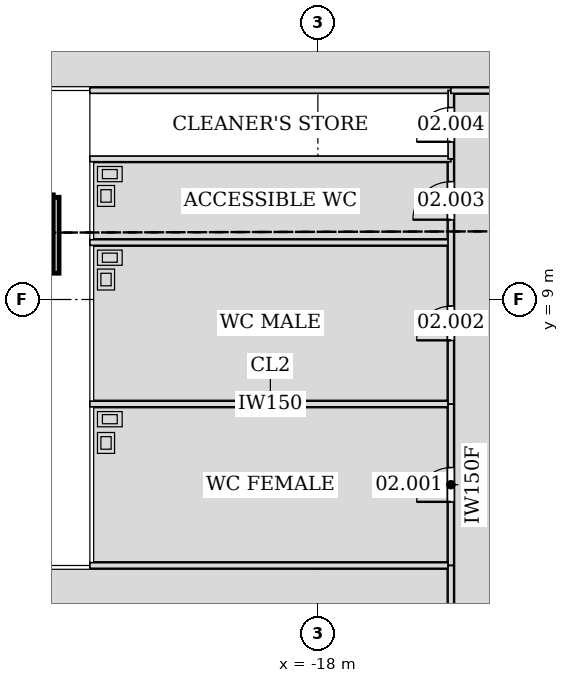
"""IFC4 building model, lengths in metres.
Left out: names, types, materials, properties, quantities, classifications, styles, units other than length and angle.
Written with IfcOpenShell. Run it as: python <this file> out.ifc"""

import sys

from ifc_helpers import new_model, si_unit, direction, frame, frame_2d, origin, origin_2d, place, context, subcontext, project, spatial, rectangle, hollow_rectangle, extrude, element, fill, save


model = new_model("IFC4")
c1 = context("Model", 3, precision=1e-05, world=origin(), true_north=direction((0.0, 1.0)))
c2 = subcontext(c1, "Body", "Model", "MODEL_VIEW")
j1 = project(units=[si_unit("LENGTHUNIT", "METRE"), si_unit("PLANEANGLEUNIT", "RADIAN")], contexts=[c1])
p1 = place(None, origin())
s1 = spatial("IfcSite", under=j1, at=p1, CompositionType="ELEMENT")
p2 = place(p1, origin())
s2 = spatial("IfcBuilding", under=s1, at=p2, CompositionType="ELEMENT")
p3 = place(p2, frame((0.0, 0.0, 13.2)))
s3 = spatial("IfcBuildingStorey", under=s2, at=p3, CompositionType="ELEMENT", Elevation=13.2)
p4 = place(p3, frame((-25.963, 10.754, 0.0), z_axis=(0.028288195063, -0.011703901791, 0.999531288506), x_axis=(0.3823083337, 0.92403481427, 0.0)))
e1 = element("IfcColumn", 1, at=p4, inside=s3, PredefinedType="COLUMN", context=c2, shape_type="SweptSolid", body=[
    extrude(hollow_rectangle(XDim=2.0, YDim=2.0, WallThickness=0.09, at=origin_2d()), origin(), (0.0, 0.0, 1.0), 5.403),
])
p5 = place(p3, frame((-14.788, 35.876, 0.0), z_axis=(0.0, 0.0, 1.0), x_axis=(-0.707106781187, -0.707106781187, 0.0)))
e2 = element("IfcWall", 2, at=p5, inside=s3, PredefinedType="SOLIDWALL", context=c2, shape_type="SweptSolid", body=[
    extrude(rectangle(XDim=29.823, YDim=0.35, at=frame_2d((14.912, 0.0))), origin(), (0.0, 0.0, 1.0), 5.1),
])
p6 = place(p5, frame((0.822, 0.0, 0.9)))
e3 = element("IfcOpeningElement", 3, at=p6, cuts=e2, PredefinedType="OPENING", context=c2, shape_type="SweptSolid", body=[
    extrude(rectangle(XDim=1.2, YDim=3.6, at=frame_2d((0.6, 1.8))), frame((0.0, 0.185, 0.0), z_axis=(0.0, -1.0, 0.0), x_axis=(1.0, 0.0, 0.0)), (0.0, 0.0, 1.0), 0.37),
])
p7 = place(p5, frame((3.52, 0.0, 0.9)))
e4 = element("IfcOpeningElement", 4, at=p7, cuts=e2, PredefinedType="OPENING", context=c2, shape_type="SweptSolid", body=[
    extrude(rectangle(XDim=1.2, YDim=3.6, at=frame_2d((0.6, 1.8))), frame((0.0, 0.185, 0.0), z_axis=(0.0, -1.0, 0.0), x_axis=(1.0, 0.0, 0.0)), (0.0, 0.0, 1.0), 0.37),
])
p8 = place(p5, frame((6.218, 0.0, 0.9)))
e5 = element("IfcOpeningElement", 5, at=p8, cuts=e2, PredefinedType="OPENING", context=c2, shape_type="SweptSolid", body=[
    extrude(rectangle(XDim=1.2, YDim=3.6, at=frame_2d((0.6, 1.8))), frame((0.0, 0.185, 0.0), z_axis=(0.0, -1.0, 0.0), x_axis=(1.0, 0.0, 0.0)), (0.0, 0.0, 1.0), 0.37),
])
p9 = place(p5, frame((8.916, 0.0, 0.9)))
e6 = element("IfcOpeningElement", 6, at=p9, cuts=e2, PredefinedType="OPENING", context=c2, shape_type="SweptSolid", body=[
    extrude(rectangle(XDim=1.2, YDim=3.6, at=frame_2d((0.6, 1.8))), frame((0.0, 0.185, 0.0), z_axis=(0.0, -1.0, 0.0), x_axis=(1.0, 0.0, 0.0)), (0.0, 0.0, 1.0), 0.37),
])
p10 = place(p5, frame((11.614, 0.0, 0.9)))
e7 = element("IfcOpeningElement", 7, at=p10, cuts=e2, PredefinedType="OPENING", context=c2, shape_type="SweptSolid", body=[
    extrude(rectangle(XDim=1.2, YDim=3.6, at=frame_2d((0.6, 1.8))), frame((0.0, 0.185, 0.0), z_axis=(0.0, -1.0, 0.0), x_axis=(1.0, 0.0, 0.0)), (0.0, 0.0, 1.0), 0.37),
])
p11 = place(p5, frame((14.312, 0.0, 0.9)))
e8 = element("IfcOpeningElement", 8, at=p11, cuts=e2, PredefinedType="OPENING", context=c2, shape_type="SweptSolid", body=[
    extrude(rectangle(XDim=1.2, YDim=3.6, at=frame_2d((0.6, 1.8))), frame((0.0, 0.185, 0.0), z_axis=(0.0, -1.0, 0.0), x_axis=(1.0, 0.0, 0.0)), (0.0, 0.0, 1.0), 0.37),
])
p12 = place(p5, frame((17.01, 0.0, 0.9)))
e9 = element("IfcOpeningElement", 9, at=p12, cuts=e2, PredefinedType="OPENING", context=c2, shape_type="SweptSolid", body=[
    extrude(rectangle(XDim=1.2, YDim=3.6, at=frame_2d((0.6, 1.8))), frame((0.0, 0.185, 0.0), z_axis=(0.0, -1.0, 0.0), x_axis=(1.0, 0.0, 0.0)), (0.0, 0.0, 1.0), 0.37),
])
p13 = place(p5, frame((19.708, 0.0, 0.9)))
e10 = element("IfcOpeningElement", 10, at=p13, cuts=e2, PredefinedType="OPENING", context=c2, shape_type="SweptSolid", body=[
    extrude(rectangle(XDim=1.2, YDim=3.6, at=frame_2d((0.6, 1.8))), frame((0.0, 0.185, 0.0), z_axis=(0.0, -1.0, 0.0), x_axis=(1.0, 0.0, 0.0)), (0.0, 0.0, 1.0), 0.37),
])
p14 = place(p5, frame((22.406, 0.0, 0.9)))
e11 = element("IfcOpeningElement", 11, at=p14, cuts=e2, PredefinedType="OPENING", context=c2, shape_type="SweptSolid", body=[
    extrude(rectangle(XDim=1.2, YDim=3.6, at=frame_2d((0.6, 1.8))), frame((0.0, 0.185, 0.0), z_axis=(0.0, -1.0, 0.0), x_axis=(1.0, 0.0, 0.0)), (0.0, 0.0, 1.0), 0.37),
])
p15 = place(p5, frame((25.104, 0.0, 0.9)))
e12 = element("IfcOpeningElement", 12, at=p15, cuts=e2, PredefinedType="OPENING", context=c2, shape_type="SweptSolid", body=[
    extrude(rectangle(XDim=1.2, YDim=3.6, at=frame_2d((0.6, 1.8))), frame((0.0, 0.185, 0.0), z_axis=(0.0, -1.0, 0.0), x_axis=(1.0, 0.0, 0.0)), (0.0, 0.0, 1.0), 0.37),
])
p16 = place(p5, frame((27.802, 0.0, 0.9)))
e13 = element("IfcOpeningElement", 13, at=p16, cuts=e2, PredefinedType="OPENING", context=c2, shape_type="SweptSolid", body=[
    extrude(rectangle(XDim=1.2, YDim=3.6, at=frame_2d((0.6, 1.8))), frame((0.0, 0.185, 0.0), z_axis=(0.0, -1.0, 0.0), x_axis=(1.0, 0.0, 0.0)), (0.0, 0.0, 1.0), 0.37),
])
for number, where, z_axis, x_axis in (
    (14, (-14.5, 6.25, 0.0), (0.0, 0.0, 1.0), (-1.0, 0.0, 0.0)),
    (15, (-24.0, 2.0, 0.0), (0.0, 0.0, 1.0), (1.0, 0.0, 0.0)),
):
    element("IfcWall", number, at=place(p3, frame(where, z_axis=z_axis, x_axis=x_axis)), inside=s3, PredefinedType="PARTITIONING", context=c2, shape_type="SweptSolid", body=[
        extrude(rectangle(XDim=9.5, YDim=0.15, at=frame_2d((4.75, 0.0))), origin(), (0.0, 0.0, 1.0), 4.231),
    ])
p17 = place(p3, frame((-14.5, 2.0, 0.0), z_axis=(0.0, 0.0, 1.0), x_axis=(0.0, 1.0, 0.0)))
e16 = element("IfcWall", 16, at=p17, inside=s3, PredefinedType="PARTITIONING", context=c2, shape_type="SweptSolid", body=[
    extrude(rectangle(XDim=4.25, YDim=0.15, at=frame_2d((2.125, 0.0))), origin(), (0.0, 0.0, 1.0), 5.1),
])
p18 = place(p17, frame((1.675, 0.0, 0.0)))
e17 = element("IfcOpeningElement", 17, at=p18, cuts=e16, PredefinedType="OPENING", context=c2, shape_type="SweptSolid", body=[
    extrude(rectangle(XDim=0.9, YDim=2.1, at=frame_2d((0.45, 1.05))), frame((0.0, 0.085, 0.0), z_axis=(0.0, -1.0, 0.0), x_axis=(1.0, 0.0, 0.0)), (0.0, 0.0, 1.0), 0.17),
])
p19 = place(p3, frame((-14.5, 10.5, 0.0), z_axis=(0.0, 0.0, 1.0), x_axis=(-1.0, 0.0, 0.0)))
e18 = element("IfcWall", 18, at=p19, inside=s3, PredefinedType="PARTITIONING", context=c2, shape_type="SweptSolid", body=[
    extrude(rectangle(XDim=9.5, YDim=0.15, at=frame_2d((4.75, 0.0))), origin(), (0.0, 0.0, 1.0), 3.79),
])
p20 = place(p3, frame((-14.5, 6.25, 0.0), z_axis=(0.0, 0.0, 1.0), x_axis=(0.0, 1.0, 0.0)))
e19 = element("IfcWall", 19, at=p20, inside=s3, PredefinedType="PARTITIONING", context=c2, shape_type="SweptSolid", body=[
    extrude(rectangle(XDim=6.45, YDim=0.15, at=frame_2d((3.225, 0.0))), origin(), (0.0, 0.0, 1.0), 3.79),
])
p21 = place(p20, frame((1.675, 0.0, 0.0)))
e20 = element("IfcOpeningElement", 20, at=p21, cuts=e19, PredefinedType="OPENING", context=c2, shape_type="SweptSolid", body=[
    extrude(rectangle(XDim=0.9, YDim=2.1, at=frame_2d((0.45, 1.05))), frame((0.0, 0.085, 0.0), z_axis=(0.0, -1.0, 0.0), x_axis=(1.0, 0.0, 0.0)), (0.0, 0.0, 1.0), 0.17),
])
p22 = place(p20, frame((4.85, 0.0, 0.0)))
e21 = element("IfcOpeningElement", 21, at=p22, cuts=e19, PredefinedType="OPENING", context=c2, shape_type="SweptSolid", body=[
    extrude(rectangle(XDim=1.0, YDim=2.1, at=frame_2d((0.5, 1.05))), frame((0.0, 0.085, 0.0), z_axis=(0.0, -1.0, 0.0), x_axis=(1.0, 0.0, 0.0)), (0.0, 0.0, 1.0), 0.17),
])
p23 = place(p3, frame((-14.5, 12.7, 0.0), z_axis=(0.0, 0.0, 1.0), x_axis=(-1.0, 0.0, 0.0)))
e22 = element("IfcWall", 22, at=p23, inside=s3, PredefinedType="PARTITIONING", context=c2, shape_type="SweptSolid", body=[
    extrude(rectangle(XDim=9.5, YDim=0.15, at=frame_2d((4.75, 0.0))), origin(), (0.0, 0.0, 1.0), 4.249),
])
p24 = place(p3, frame((-14.5, 14.5, 0.0), z_axis=(0.0, 0.0, 1.0), x_axis=(-1.0, 0.0, 0.0)))
e23 = element("IfcWall", 23, at=p24, inside=s3, PredefinedType="PARTITIONING", context=c2, shape_type="SweptSolid", body=[
    extrude(rectangle(XDim=9.5, YDim=0.15, at=frame_2d((4.75, 0.0))), origin(), (0.0, 0.0, 1.0), 4.049),
])
p25 = place(p3, frame((-14.5, 12.7, 0.0), z_axis=(0.0, 0.0, 1.0), x_axis=(0.0, 1.0, 0.0)))
e24 = element("IfcWall", 24, at=p25, inside=s3, PredefinedType="PARTITIONING", context=c2, shape_type="SweptSolid", body=[
    extrude(rectangle(XDim=1.8, YDim=0.15, at=frame_2d((0.9, 0.0))), origin(), (0.0, 0.0, 1.0), 4.049),
])
p26 = place(p25, frame((0.45, 0.0, 0.0)))
e25 = element("IfcOpeningElement", 25, at=p26, cuts=e24, PredefinedType="OPENING", context=c2, shape_type="SweptSolid", body=[
    extrude(rectangle(XDim=0.9, YDim=2.1, at=frame_2d((0.45, 1.05))), frame((0.0, 0.085, 0.0), z_axis=(0.0, -1.0, 0.0), x_axis=(1.0, 0.0, 0.0)), (0.0, 0.0, 1.0), 0.17),
])
p27 = place(p3, frame((-14.501, 14.5, 0.0), z_axis=(0.0, 0.0, 1.0), x_axis=(1.0, 0.0, 0.0)))
e26 = element("IfcWall", 26, at=p27, inside=s3, PredefinedType="PARTITIONING", context=c2, shape_type="SweptSolid", body=[
    extrude(rectangle(XDim=29.002, YDim=0.15, at=frame_2d((14.501, 0.0))), origin(), (0.0, 0.0, 1.0), 3.79),
])
p28 = place(p27, frame((4.384, 0.0, 0.0)))
e27 = element("IfcOpeningElement", 27, at=p28, cuts=e26, PredefinedType="OPENING", context=c2, shape_type="SweptSolid", body=[
    extrude(rectangle(XDim=1.8, YDim=2.4, at=frame_2d((0.9, 1.2))), frame((0.0, 0.085, 0.0), z_axis=(0.0, -1.0, 0.0), x_axis=(1.0, 0.0, 0.0)), (0.0, 0.0, 1.0), 0.17),
])
p29 = place(p27, frame((9.667, 0.0, 0.0)))
e28 = element("IfcOpeningElement", 28, at=p29, cuts=e26, PredefinedType="OPENING", context=c2, shape_type="SweptSolid", body=[
    extrude(rectangle(XDim=1.8, YDim=2.4, at=frame_2d((0.9, 1.2))), frame((0.0, 0.085, 0.0), z_axis=(0.0, -1.0, 0.0), x_axis=(1.0, 0.0, 0.0)), (0.0, 0.0, 1.0), 0.17),
])
p30 = place(p27, frame((19.335, 0.0, 0.0)))
e29 = element("IfcOpeningElement", 29, at=p30, cuts=e26, PredefinedType="OPENING", context=c2, shape_type="SweptSolid", body=[
    extrude(rectangle(XDim=1.8, YDim=2.4, at=frame_2d((0.9, 1.2))), frame((0.0, 0.085, 0.0), z_axis=(0.0, -1.0, 0.0), x_axis=(1.0, 0.0, 0.0)), (0.0, 0.0, 1.0), 0.17),
])
p31 = place(p27, frame((23.718, 0.0, 0.0)))
e30 = element("IfcOpeningElement", 30, at=p31, cuts=e26, PredefinedType="OPENING", context=c2, shape_type="SweptSolid", body=[
    extrude(rectangle(XDim=1.8, YDim=2.4, at=frame_2d((0.9, 1.2))), frame((0.0, 0.085, 0.0), z_axis=(0.0, -1.0, 0.0), x_axis=(1.0, 0.0, 0.0)), (0.0, 0.0, 1.0), 0.17),
])
p32 = place(p3, frame((-14.5, -14.5, 0.0), z_axis=(0.0, 0.0, 1.0), x_axis=(0.0, 1.0, 0.0)))
e31 = element("IfcWall", 31, at=p32, inside=s3, PredefinedType="PARTITIONING", context=c2, shape_type="SweptSolid", body=[
    extrude(rectangle(XDim=16.5, YDim=0.15, at=frame_2d((8.25, 0.0))), origin(), (0.0, 0.0, 1.0), 3.79),
])
p33 = place(p18, origin())
e32 = element("IfcDoor", 32, at=p33, inside=s3, OperationType="SINGLE_SWING_LEFT", PredefinedType="DOOR", context=c2, shape_type="SweptSolid", body=[
    extrude(rectangle(XDim=0.9, YDim=2.1, at=frame_2d((0.45, 1.05))), frame((0.0, 0.025, 0.0), z_axis=(0.0, -1.0, 0.0), x_axis=(1.0, 0.0, 0.0)), (0.0, 0.0, 1.0), 0.05),
])
fill(e17, e32)
p34 = place(p21, origin())
e33 = element("IfcDoor", 33, at=p34, inside=s3, OperationType="SINGLE_SWING_LEFT", PredefinedType="DOOR", context=c2, shape_type="SweptSolid", body=[
    extrude(rectangle(XDim=0.9, YDim=2.1, at=frame_2d((0.45, 1.05))), frame((0.0, 0.025, 0.0), z_axis=(0.0, -1.0, 0.0), x_axis=(1.0, 0.0, 0.0)), (0.0, 0.0, 1.0), 0.05),
])
fill(e20, e33)
p35 = place(p22, origin())
e34 = element("IfcDoor", 34, at=p35, inside=s3, OperationType="SINGLE_SWING_LEFT", PredefinedType="DOOR", context=c2, shape_type="SweptSolid", body=[
    extrude(rectangle(XDim=1.0, YDim=2.1, at=frame_2d((0.5, 1.05))), frame((0.0, 0.025, 0.0), z_axis=(0.0, -1.0, 0.0), x_axis=(1.0, 0.0, 0.0)), (0.0, 0.0, 1.0), 0.05),
])
fill(e21, e34)
p36 = place(p26, origin())
e35 = element("IfcDoor", 35, at=p36, inside=s3, OperationType="SINGLE_SWING_LEFT", PredefinedType="DOOR", context=c2, shape_type="SweptSolid", body=[
    extrude(rectangle(XDim=0.9, YDim=2.1, at=frame_2d((0.45, 1.05))), frame((0.0, 0.025, 0.0), z_axis=(0.0, -1.0, 0.0), x_axis=(1.0, 0.0, 0.0)), (0.0, 0.0, 1.0), 0.05),
])
fill(e25, e35)
save(model, sys.argv[1])
